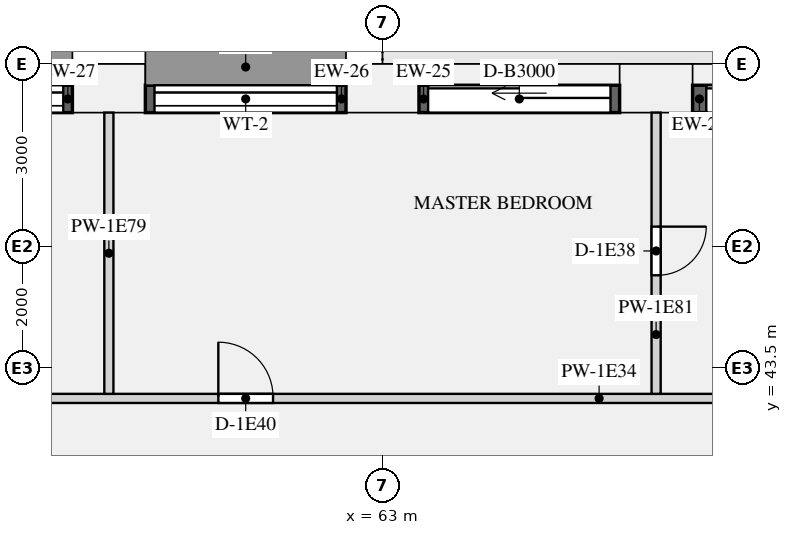
"""IFC4 building model, lengths in metres.
Left out: names, types, materials, properties, quantities, classifications, styles, units other than length and angle.
Written with IfcOpenShell. Run it as: python <this file> out.ifc"""

import sys

from ifc_helpers import new_model, si_unit, direction, frame, frame_2d, origin, origin_2d, place, context, subcontext, project, spatial, rectangle, extrude, element, fill, save


model = new_model("IFC4")
c1 = context("Model", 3, precision=1e-05, world=origin(), true_north=direction((0.0, 1.0)))
c2 = subcontext(c1, "Body", "Model", "MODEL_VIEW")
j1 = project(units=[si_unit("LENGTHUNIT", "METRE"), si_unit("PLANEANGLEUNIT", "RADIAN")], contexts=[c1])
p1 = place(None, origin())
s1 = spatial("IfcSite", under=j1, at=p1, CompositionType="ELEMENT")
p2 = place(p1, origin())
s2 = spatial("IfcBuilding", under=s1, at=p2, CompositionType="ELEMENT")
p3 = place(p2, frame((0.0, 0.0, 54.15)))
s3 = spatial("IfcBuildingStorey", under=s2, at=p3, CompositionType="ELEMENT", Elevation=54.15)
for number, where, z_axis, x_axis in (
    (1, (67.5, 48.1, 0.0), (0.0, 0.0, 1.0), (-1.0, 0.0, 0.0)),
    (2, (63.0, 48.1, 0.0), (0.0, 0.0, 1.0), (-1.0, 0.0, 0.0)),
    (3, (58.5, 48.1, 0.0), (0.0, 0.0, 1.0), (-1.0, 0.0, 0.0)),
):
    element("IfcColumn", number, at=place(p3, frame(where, z_axis=z_axis, x_axis=x_axis)), inside=s3, PredefinedType="USERDEFINED", context=c2, shape_type="SweptSolid", body=[
        extrude(rectangle(XDim=1.2, YDim=0.8, at=origin_2d()), origin(), (0.0, 0.0, 1.0), 3.15),
    ])
p4 = place(p3, frame((70.8, 47.925, 0.0), z_axis=(0.0, 0.0, 1.0), x_axis=(-1.0, 0.0, 0.0)))
e4 = element("IfcWall", 4, at=p4, inside=s3, PredefinedType="SOLIDWALL", context=c2, shape_type="SweptSolid", body=[
    extrude(rectangle(XDim=2.7, YDim=0.45, at=frame_2d((1.35, 0.0))), origin(), (0.0, 0.0, 1.0), 2.83),
])
p5 = place(p4, frame((0.225, 0.0, 0.0)))
e5 = element("IfcOpeningElement", 5, at=p5, cuts=e4, PredefinedType="OPENING", context=c2, shape_type="SweptSolid", body=[
    extrude(rectangle(XDim=2.25, YDim=2.3, at=frame_2d((1.125, 1.15))), frame((0.0, 0.235, 0.0), z_axis=(0.0, -1.0, 0.0), x_axis=(1.0, 0.0, 0.0)), (0.0, 0.0, 1.0), 0.47),
])
p6 = place(p3, frame((66.9, 47.925, 0.0), z_axis=(0.0, 0.0, 1.0), x_axis=(-1.0, 0.0, 0.0)))
e6 = element("IfcWall", 6, at=p6, inside=s3, PredefinedType="SOLIDWALL", context=c2, shape_type="SweptSolid", body=[
    extrude(rectangle(XDim=3.3, YDim=0.45, at=frame_2d((1.65, 0.0))), origin(), (0.0, 0.0, 1.0), 2.83),
])
p7 = place(p6, frame((0.15, 0.0, 0.0)))
e7 = element("IfcOpeningElement", 7, at=p7, cuts=e6, PredefinedType="OPENING", context=c2, shape_type="SweptSolid", body=[
    extrude(rectangle(XDim=3.0, YDim=2.3, at=frame_2d((1.5, 1.15))), frame((0.0, 0.235, 0.0), z_axis=(0.0, -1.0, 0.0), x_axis=(1.0, 0.0, 0.0)), (0.0, 0.0, 1.0), 0.47),
])
p8 = place(p3, frame((62.4, 47.925, 0.9), z_axis=(0.0, 0.0, 1.0), x_axis=(-1.0, 0.0, 0.0)))
e8 = element("IfcWall", 8, at=p8, inside=s3, PredefinedType="SOLIDWALL", context=c2, shape_type="SweptSolid", body=[
    extrude(rectangle(XDim=3.3, YDim=0.45, at=frame_2d((1.65, 0.0))), origin(), (0.0, 0.0, 1.0), 1.93),
])
p9 = place(p8, frame((0.15, 0.0, 0.15)))
e9 = element("IfcOpeningElement", 9, at=p9, cuts=e8, PredefinedType="OPENING", context=c2, shape_type="SweptSolid", body=[
    extrude(rectangle(XDim=3.0, YDim=1.5, at=frame_2d((1.5, 0.75))), frame((0.0, 0.235, 0.0), z_axis=(0.0, -1.0, 0.0), x_axis=(1.0, 0.0, 0.0)), (0.0, 0.0, 1.0), 0.47),
])
p10 = place(p3, frame((57.9, 47.925, 0.9), z_axis=(0.0, 0.0, 1.0), x_axis=(-1.0, 0.0, 0.0)))
e10 = element("IfcWall", 10, at=p10, inside=s3, PredefinedType="SOLIDWALL", context=c2, shape_type="SweptSolid", body=[
    extrude(rectangle(XDim=3.3, YDim=0.45, at=frame_2d((1.65, 0.0))), origin(), (0.0, 0.0, 1.0), 1.93),
])
p11 = place(p10, frame((0.15, 0.0, 0.15)))
e11 = element("IfcOpeningElement", 11, at=p11, cuts=e10, PredefinedType="OPENING", context=c2, shape_type="SweptSolid", body=[
    extrude(rectangle(XDim=3.0, YDim=1.5, at=frame_2d((1.5, 0.75))), frame((0.0, 0.235, 0.0), z_axis=(0.0, -1.0, 0.0), x_axis=(1.0, 0.0, 0.0)), (0.0, 0.0, 1.0), 0.47),
])
p12 = place(p3, frame((54.075, 43.0, 0.0), z_axis=(0.0, 0.0, 1.0), x_axis=(1.0, 0.0, 0.0)))
e12 = element("IfcWall", 12, at=p12, inside=s3, PredefinedType="PARTITIONING", context=c2, shape_type="SweptSolid", body=[
    extrude(rectangle(XDim=17.85, YDim=0.15, at=frame_2d((8.925, 0.0))), origin(), (0.0, 0.0, 1.0), 2.83),
])
p13 = place(p12, frame((6.225, 0.0, 0.0)))
e13 = element("IfcOpeningElement", 13, at=p13, cuts=e12, PredefinedType="OPENING", context=c2, shape_type="SweptSolid", body=[
    extrude(rectangle(XDim=0.9, YDim=2.1, at=frame_2d((0.45, 1.05))), frame((0.0, 0.085, 0.0), z_axis=(0.0, -1.0, 0.0), x_axis=(1.0, 0.0, 0.0)), (0.0, 0.0, 1.0), 0.17),
])
p14 = place(p12, frame((1.725, 0.0, 0.0)))
e14 = element("IfcOpeningElement", 14, at=p14, cuts=e12, PredefinedType="OPENING", context=c2, shape_type="SweptSolid", body=[
    extrude(rectangle(XDim=0.9, YDim=2.1, at=frame_2d((0.45, 1.05))), frame((0.0, 0.085, 0.0), z_axis=(0.0, -1.0, 0.0), x_axis=(1.0, 0.0, 0.0)), (0.0, 0.0, 1.0), 0.17),
])
p15 = place(p3, frame((58.5, 43.075, 0.0), z_axis=(0.0, 0.0, 1.0), x_axis=(0.0, 1.0, 0.0)))
e15 = element("IfcWall", 15, at=p15, inside=s3, PredefinedType="PARTITIONING", context=c2, shape_type="SweptSolid", body=[
    extrude(rectangle(XDim=4.625, YDim=0.15, at=frame_2d((2.312, 0.0))), origin(), (0.0, 0.0, 1.0), 2.83),
])
p16 = place(p3, frame((67.5, 43.075, 0.0), z_axis=(0.0, 0.0, 1.0), x_axis=(0.0, 1.0, 0.0)))
e16 = element("IfcWall", 16, at=p16, inside=s3, PredefinedType="PARTITIONING", context=c2, shape_type="SweptSolid", body=[
    extrude(rectangle(XDim=4.625, YDim=0.15, at=frame_2d((2.312, 0.0))), origin(), (0.0, 0.0, 1.0), 2.83),
])
p17 = place(p16, frame((1.95, 0.0, 0.0)))
e17 = element("IfcOpeningElement", 17, at=p17, cuts=e16, PredefinedType="OPENING", context=c2, shape_type="SweptSolid", body=[
    extrude(rectangle(XDim=0.8, YDim=2.1, at=frame_2d((0.4, 1.05))), frame((0.0, 0.085, 0.0), z_axis=(0.0, -1.0, 0.0), x_axis=(1.0, 0.0, 0.0)), (0.0, 0.0, 1.0), 0.17),
])
p18 = place(p5, origin())
e18 = element("IfcDoor", 18, at=p18, inside=s3, OperationType="SLIDING_TO_LEFT", PredefinedType="DOOR", context=c2, shape_type="SweptSolid", body=[
    extrude(rectangle(XDim=2.25, YDim=2.3, at=frame_2d((1.125, 1.15))), frame((0.0, -0.07, 0.0), z_axis=(0.0, -1.0, 0.0), x_axis=(1.0, 0.0, 0.0)), (0.0, 0.0, 1.0), 0.05),
])
fill(e5, e18)
p19 = place(p7, origin())
e19 = element("IfcDoor", 19, at=p19, inside=s3, OperationType="SLIDING_TO_LEFT", PredefinedType="DOOR", context=c2, shape_type="SweptSolid", body=[
    extrude(rectangle(XDim=3.0, YDim=2.3, at=frame_2d((1.5, 1.15))), frame((0.0, -0.07, 0.0), z_axis=(0.0, -1.0, 0.0), x_axis=(1.0, 0.0, 0.0)), (0.0, 0.0, 1.0), 0.05),
])
fill(e7, e19)
p20 = place(p9, origin())
e20 = element("IfcWindow", 20, at=p20, inside=s3, PartitioningType="SINGLE_PANEL", PredefinedType="WINDOW", context=c2, shape_type="SweptSolid", body=[
    extrude(rectangle(XDim=3.0, YDim=1.5, at=frame_2d((1.5, 0.75))), frame((0.0, -0.065, 0.0), z_axis=(0.0, -1.0, 0.0), x_axis=(1.0, 0.0, 0.0)), (0.0, 0.0, 1.0), 0.06),
])
fill(e9, e20)
p21 = place(p11, origin())
e21 = element("IfcWindow", 21, at=p21, inside=s3, PartitioningType="SINGLE_PANEL", PredefinedType="WINDOW", context=c2, shape_type="SweptSolid", body=[
    extrude(rectangle(XDim=3.0, YDim=1.5, at=frame_2d((1.5, 0.75))), frame((0.0, -0.065, 0.0), z_axis=(0.0, -1.0, 0.0), x_axis=(1.0, 0.0, 0.0)), (0.0, 0.0, 1.0), 0.06),
])
fill(e11, e21)
p22 = place(p17, frame((0.8, 0.0, 0.0), z_axis=(0.0, 0.0, 1.0), x_axis=(-1.0, 0.0, 0.0)))
e22 = element("IfcDoor", 22, at=p22, inside=s3, OperationType="SINGLE_SWING_LEFT", PredefinedType="DOOR", context=c2, shape_type="SweptSolid", body=[
    extrude(rectangle(XDim=0.8, YDim=2.1, at=frame_2d((0.4, 1.05))), frame((0.0, 0.025, 0.0), z_axis=(0.0, -1.0, 0.0), x_axis=(1.0, 0.0, 0.0)), (0.0, 0.0, 1.0), 0.05),
])
fill(e17, e22)
p23 = place(p13, origin())
e23 = element("IfcDoor", 23, at=p23, inside=s3, OperationType="SINGLE_SWING_LEFT", PredefinedType="DOOR", context=c2, shape_type="SweptSolid", body=[
    extrude(rectangle(XDim=0.9, YDim=2.1, at=frame_2d((0.45, 1.05))), frame((0.0, 0.025, 0.0), z_axis=(0.0, -1.0, 0.0), x_axis=(1.0, 0.0, 0.0)), (0.0, 0.0, 1.0), 0.05),
])
fill(e13, e23)
save(model, sys.argv[1])
